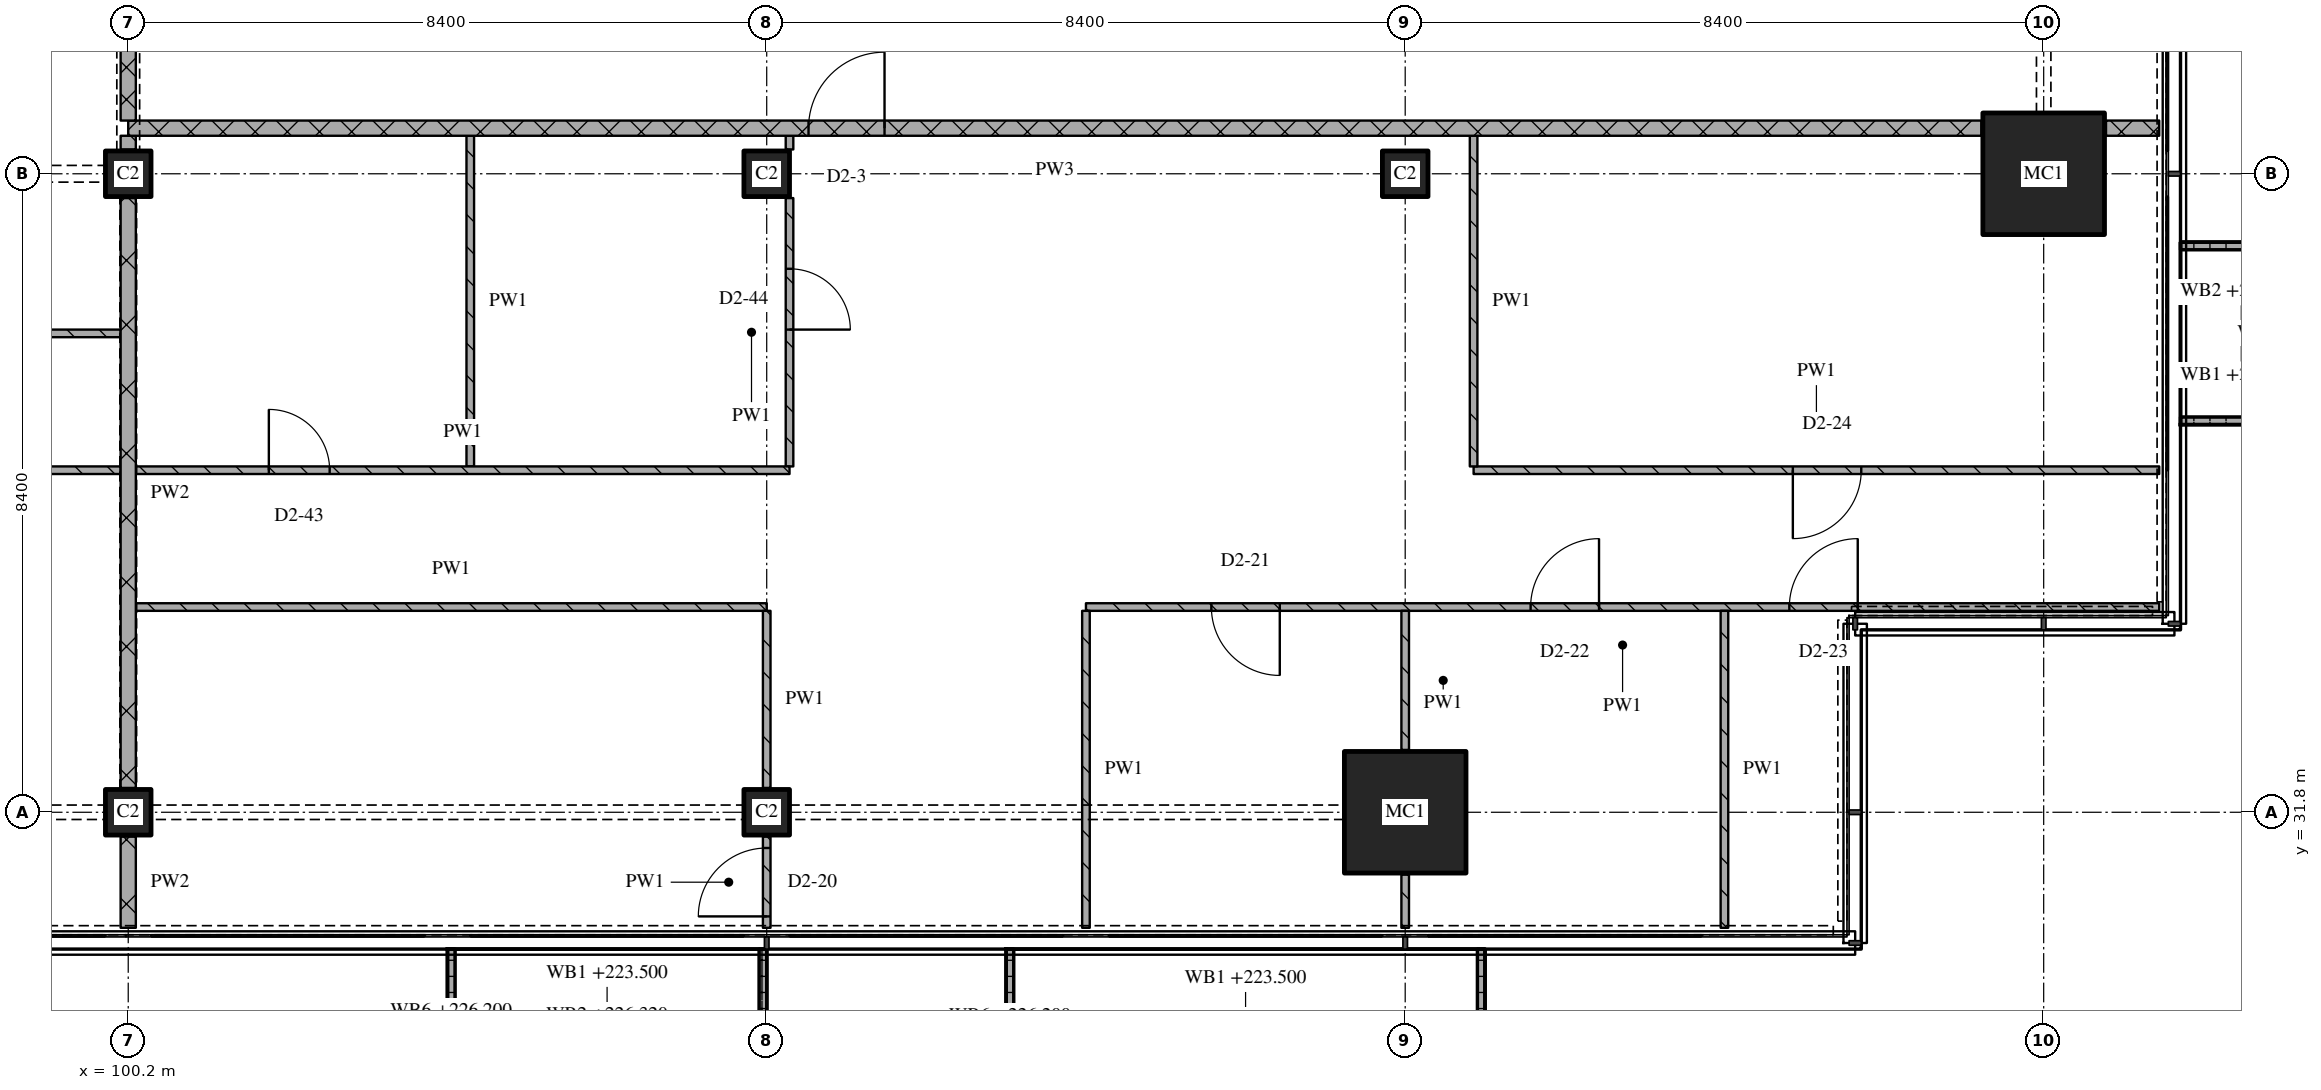
"""IFC4 building model, lengths in metres.
Left out: names, types, materials, properties, quantities, classifications, styles, units other than length and angle.
Written with IfcOpenShell. Run it as: python <this file> out.ifc"""

import sys

from ifc_helpers import new_model, si_unit, direction, frame, frame_2d, origin, origin_2d, place, context, subcontext, project, spatial, polyline, rectangle, outline, extrude, element, fill, save


model = new_model("IFC4")
c1 = context("Model", 3, precision=1e-05, world=origin(), true_north=direction((0.0, 1.0)))
c2 = subcontext(c1, "Body", "Model", "MODEL_VIEW")
j1 = project(units=[si_unit("LENGTHUNIT", "METRE"), si_unit("PLANEANGLEUNIT", "RADIAN")], contexts=[c1])
p1 = place(None, origin())
s1 = spatial("IfcSite", under=j1, at=p1, CompositionType="ELEMENT")
p2 = place(p1, origin())
s2 = spatial("IfcBuilding", under=s1, at=p2, CompositionType="ELEMENT")
p3 = place(p2, frame((0.0, 0.0, 223.5)))
s3 = spatial("IfcBuildingStorey", under=s2, at=p3, CompositionType="ELEMENT", Elevation=223.5)
for number, where, z_axis, x_axis in (
    (1, (100.2, 31.8, 0.0), (0.0, 0.0, 1.0), (1.0, 0.0, 0.0)),
    (2, (100.2, 40.2, 0.0), (0.0, 0.0, 1.0), (1.0, 0.0, 0.0)),
    (3, (108.6, 31.8, 0.0), (0.0, 0.0, 1.0), (1.0, 0.0, 0.0)),
    (4, (108.6, 40.2, 0.0), (0.0, 0.0, 1.0), (1.0, 0.0, 0.0)),
):
    element("IfcColumn", number, at=place(p3, frame(where, z_axis=z_axis, x_axis=x_axis)), inside=s3, PredefinedType="COLUMN", context=c2, shape_type="SweptSolid", body=[
        extrude(rectangle(XDim=0.6, YDim=0.6, at=origin_2d()), origin(), (0.0, 0.0, 1.0), 3.6),
    ])
p4 = place(p3, frame((117.0, 31.8, 0.0), z_axis=(0.0, 0.0, 1.0), x_axis=(1.0, 0.0, 0.0)))
e5 = element("IfcColumn", 5, at=p4, inside=s3, PredefinedType="COLUMN", context=c2, shape_type="SweptSolid", body=[
    extrude(rectangle(XDim=1.6, YDim=1.6, at=origin_2d()), origin(), (0.0, 0.0, 1.0), 3.6),
])
p5 = place(p3, frame((117.0, 40.2, 0.0), z_axis=(0.0, 0.0, 1.0), x_axis=(1.0, 0.0, 0.0)))
e6 = element("IfcColumn", 6, at=p5, inside=s3, PredefinedType="COLUMN", context=c2, shape_type="SweptSolid", body=[
    extrude(rectangle(XDim=0.6, YDim=0.6, at=origin_2d()), origin(), (0.0, 0.0, 1.0), 3.6),
])
p6 = place(p3, frame((125.4, 40.2, 0.0), z_axis=(0.0, 0.0, 1.0), x_axis=(1.0, 0.0, 0.0)))
e7 = element("IfcColumn", 7, at=p6, inside=s3, PredefinedType="COLUMN", context=c2, shape_type="SweptSolid", body=[
    extrude(rectangle(XDim=1.6, YDim=1.6, at=origin_2d()), origin(), (0.0, 0.0, 1.0), 3.6),
])
p7 = place(p3, origin())
e8 = element("IfcWall", 8, at=p7, inside=s3, PredefinedType="SOLIDWALL", context=c2, shape_type="SweptSolid", body=[
    extrude(outline(polyline([(104.4, 30.0), (104.5, 30.0), (104.5, 28.367), (108.5, 28.367), (108.5, 30.0), (108.6, 30.0), (108.6, 28.267), (104.4, 28.267), (104.4, 30.0)])), origin(), (0.0, 0.0, 1.0), 1.0),
])
p8 = place(p3, origin())
e9 = element("IfcWall", 9, at=p8, inside=s3, PredefinedType="SOLIDWALL", context=c2, shape_type="SweptSolid", body=[
    extrude(outline(polyline([(111.75, 30.0), (111.85, 30.0), (111.85, 28.233), (117.95, 28.233), (117.95, 30.0), (118.05, 30.0), (118.05, 28.133), (111.75, 28.133), (111.75, 30.0)])), origin(), (0.0, 0.0, 1.0), 1.0),
])
p9 = place(p3, origin())
e10 = element("IfcWall", 10, at=p9, inside=s3, PredefinedType="SOLIDWALL", context=c2, shape_type="SweptSolid", body=[
    extrude(outline(polyline([(127.2, 36.9), (127.2, 37.0), (128.7, 37.0), (128.7, 39.2), (127.2, 39.2), (127.2, 39.3), (128.8, 39.3), (128.8, 36.9), (127.2, 36.9)])), origin(), (0.0, 0.0, 1.0), 1.0),
])
p10 = place(p3, frame((100.3, 34.5, 0.0), z_axis=(0.0, 0.0, 1.0), x_axis=(1.0, 0.0, 0.0)))
e11 = element("IfcWall", 11, at=p10, inside=s3, PredefinedType="PARTITIONING", context=c2, shape_type="SweptSolid", body=[
    extrude(rectangle(XDim=8.3, YDim=0.1, at=frame_2d((4.15, 0.0))), origin(), (0.0, 0.0, 1.0), 3.32),
])
p11 = place(p3, frame((126.92, 34.5, 0.0), z_axis=(0.0, 0.0, 1.0), x_axis=(-1.0, 0.0, 0.0)))
e12 = element("IfcWall", 12, at=p11, inside=s3, PredefinedType="PARTITIONING", context=c2, shape_type="SweptSolid", body=[
    extrude(rectangle(XDim=14.12, YDim=0.1, at=frame_2d((7.06, 0.0))), origin(), (0.0, 0.0, 1.0), 3.32),
])
p12 = place(p11, frame((3.966, 0.0, 0.0)))
e13 = element("IfcOpeningElement", 13, at=p12, cuts=e12, PredefinedType="OPENING", context=c2, shape_type="SweptSolid", body=[
    extrude(rectangle(XDim=0.9, YDim=2.1, at=frame_2d((0.45, 1.05))), frame((0.0, 0.06, 0.0), z_axis=(0.0, -1.0, 0.0), x_axis=(1.0, 0.0, 0.0)), (0.0, 0.0, 1.0), 0.12),
])
p13 = place(p11, frame((7.37, 0.0, 0.0)))
e14 = element("IfcOpeningElement", 14, at=p13, cuts=e12, PredefinedType="OPENING", context=c2, shape_type="SweptSolid", body=[
    extrude(rectangle(XDim=0.9, YDim=2.1, at=frame_2d((0.45, 1.05))), frame((0.0, 0.06, 0.0), z_axis=(0.0, -1.0, 0.0), x_axis=(1.0, 0.0, 0.0)), (0.0, 0.0, 1.0), 0.12),
])
p14 = place(p11, frame((11.57, 0.0, 0.0)))
e15 = element("IfcOpeningElement", 15, at=p14, cuts=e12, PredefinedType="OPENING", context=c2, shape_type="SweptSolid", body=[
    extrude(rectangle(XDim=0.9, YDim=2.1, at=frame_2d((0.45, 1.05))), frame((0.0, 0.06, 0.0), z_axis=(0.0, -1.0, 0.0), x_axis=(1.0, 0.0, 0.0)), (0.0, 0.0, 1.0), 0.12),
])
p15 = place(p3, frame((117.9, 36.3, 0.0), z_axis=(0.0, 0.0, 1.0), x_axis=(1.0, 0.0, 0.0)))
e16 = element("IfcWall", 16, at=p15, inside=s3, PredefinedType="PARTITIONING", context=c2, shape_type="SweptSolid", body=[
    extrude(rectangle(XDim=9.02, YDim=0.1, at=frame_2d((4.51, 0.0))), origin(), (0.0, 0.0, 1.0), 3.32),
])
p16 = place(p15, frame((4.2, 0.0, 0.0)))
e17 = element("IfcOpeningElement", 17, at=p16, cuts=e16, PredefinedType="OPENING", context=c2, shape_type="SweptSolid", body=[
    extrude(rectangle(XDim=0.9, YDim=2.1, at=frame_2d((0.45, 1.05))), frame((0.0, 0.06, 0.0), z_axis=(0.0, -1.0, 0.0), x_axis=(1.0, 0.0, 0.0)), (0.0, 0.0, 1.0), 0.12),
])
p17 = place(p3, frame((95.4, 38.1, 0.0), z_axis=(0.0, 0.0, 1.0), x_axis=(1.0, 0.0, 0.0)))
e18 = element("IfcWall", 18, at=p17, inside=s3, PredefinedType="PARTITIONING", context=c2, shape_type="SweptSolid", body=[
    extrude(rectangle(XDim=4.7, YDim=0.1, at=frame_2d((2.35, 0.0))), origin(), (0.0, 0.0, 1.0), 3.32),
])
p18 = place(p17, frame((1.95, 0.0, 0.0)))
e19 = element("IfcOpeningElement", 19, at=p18, cuts=e18, PredefinedType="OPENING", context=c2, shape_type="SweptSolid", body=[
    extrude(rectangle(XDim=0.9, YDim=2.1, at=frame_2d((0.45, 1.05))), frame((0.0, 0.06, 0.0), z_axis=(0.0, -1.0, 0.0), x_axis=(1.0, 0.0, 0.0)), (0.0, 0.0, 1.0), 0.12),
])
p19 = place(p3, frame((124.58, 40.8, 0.0), z_axis=(0.0, 0.0, 1.0), x_axis=(-1.0, 0.0, 0.0)))
e20 = element("IfcWall", 20, at=p19, inside=s3, PredefinedType="PARTITIONING", context=c2, shape_type="SweptSolid", body=[
    extrude(rectangle(XDim=24.38, YDim=0.2, at=frame_2d((12.19, 0.0))), origin(), (0.0, 0.0, 1.0), 3.32),
])
p20 = place(p19, frame((14.43, 0.0, 0.0)))
e21 = element("IfcOpeningElement", 21, at=p20, cuts=e20, PredefinedType="OPENING", context=c2, shape_type="SweptSolid", body=[
    extrude(rectangle(XDim=1.0, YDim=2.1, at=frame_2d((0.5, 1.05))), frame((0.0, 0.11, 0.0), z_axis=(0.0, -1.0, 0.0), x_axis=(1.0, 0.0, 0.0)), (0.0, 0.0, 1.0), 0.22),
])
p21 = place(p3, frame((126.22, 40.8, 0.0), z_axis=(0.0, 0.0, 1.0), x_axis=(1.0, 0.0, 0.0)))
e22 = element("IfcWall", 22, at=p21, inside=s3, PredefinedType="PARTITIONING", context=c2, shape_type="SweptSolid", body=[
    extrude(rectangle(XDim=0.7, YDim=0.2, at=frame_2d((0.35, 0.0))), origin(), (0.0, 0.0, 1.0), 3.32),
])
p22 = place(p3, frame((100.2, 43.1, 0.0), z_axis=(0.0, 0.0, 1.0), x_axis=(0.0, -1.0, 0.0)))
e23 = element("IfcWall", 23, at=p22, inside=s3, PredefinedType="PARTITIONING", context=c2, shape_type="SweptSolid", body=[
    extrude(rectangle(XDim=2.2, YDim=0.2, at=frame_2d((1.1, 0.0))), origin(), (0.0, 0.0, 1.0), 2.53),
])
p23 = place(p3, frame((100.2, 31.48, 0.0), z_axis=(0.0, 0.0, 1.0), x_axis=(0.0, -1.0, 0.0)))
e24 = element("IfcWall", 24, at=p23, inside=s3, PredefinedType="PARTITIONING", context=c2, shape_type="SweptSolid", body=[
    extrude(rectangle(XDim=1.2, YDim=0.2, at=frame_2d((0.6, 0.0))), origin(), (0.0, 0.0, 1.0), 3.32),
])
p24 = place(p3, frame((100.2, 39.88, 0.0), z_axis=(0.0, 0.0, 1.0), x_axis=(0.0, -1.0, 0.0)))
e25 = element("IfcWall", 25, at=p24, inside=s3, PredefinedType="PARTITIONING", context=c2, shape_type="SweptSolid", body=[
    extrude(rectangle(XDim=7.76, YDim=0.2, at=frame_2d((3.88, 0.0))), origin(), (0.0, 0.0, 1.0), 2.72),
])
p25 = place(p3, frame((100.2, 40.7, 0.0), z_axis=(0.0, 0.0, 1.0), x_axis=(0.0, -1.0, 0.0)))
e26 = element("IfcWall", 26, at=p25, inside=s3, PredefinedType="PARTITIONING", context=c2, shape_type="SweptSolid", body=[
    extrude(rectangle(XDim=0.18, YDim=0.2, at=frame_2d((0.09, 0.0))), origin(), (0.0, 0.0, 1.0), 3.32),
])
p26 = place(p3, frame((104.7, 40.7, 0.0), z_axis=(0.0, 0.0, 1.0), x_axis=(0.0, -1.0, 0.0)))
e27 = element("IfcWall", 27, at=p26, inside=s3, PredefinedType="PARTITIONING", context=c2, shape_type="SweptSolid", body=[
    extrude(rectangle(XDim=4.35, YDim=0.1, at=frame_2d((2.175, 0.0))), origin(), (0.0, 0.0, 1.0), 3.32),
])
p27 = place(p3, frame((108.6, 30.28, 0.0), z_axis=(0.0, 0.0, 1.0), x_axis=(0.0, 1.0, 0.0)))
e28 = element("IfcWall", 28, at=p27, inside=s3, PredefinedType="PARTITIONING", context=c2, shape_type="SweptSolid", body=[
    extrude(rectangle(XDim=1.2, YDim=0.1, at=frame_2d((0.6, 0.0))), origin(), (0.0, 0.0, 1.0), 3.32),
])
p28 = place(p27, frame((0.15, 0.0, 0.0)))
e29 = element("IfcOpeningElement", 29, at=p28, cuts=e28, PredefinedType="OPENING", context=c2, shape_type="SweptSolid", body=[
    extrude(rectangle(XDim=0.9, YDim=2.1, at=frame_2d((0.45, 1.05))), frame((0.0, 0.06, 0.0), z_axis=(0.0, -1.0, 0.0), x_axis=(1.0, 0.0, 0.0)), (0.0, 0.0, 1.0), 0.12),
])
p29 = place(p3, frame((108.6, 34.45, 0.0), z_axis=(0.0, 0.0, 1.0), x_axis=(0.0, -1.0, 0.0)))
e30 = element("IfcWall", 30, at=p29, inside=s3, PredefinedType="PARTITIONING", context=c2, shape_type="SweptSolid", body=[
    extrude(rectangle(XDim=2.33, YDim=0.1, at=frame_2d((1.165, 0.0))), origin(), (0.0, 0.0, 1.0), 3.32),
])
p30 = place(p3, frame((108.9, 36.35, 0.0), z_axis=(0.0, 0.0, 1.0), x_axis=(0.0, 1.0, 0.0)))
e31 = element("IfcWall", 31, at=p30, inside=s3, PredefinedType="PARTITIONING", context=c2, shape_type="SweptSolid", body=[
    extrude(rectangle(XDim=3.53, YDim=0.1, at=frame_2d((1.765, 0.0))), origin(), (0.0, 0.0, 1.0), 3.32),
])
p31 = place(p30, frame((1.8, 0.0, 0.0)))
e32 = element("IfcOpeningElement", 32, at=p31, cuts=e31, PredefinedType="OPENING", context=c2, shape_type="SweptSolid", body=[
    extrude(rectangle(XDim=0.8, YDim=2.1, at=frame_2d((0.4, 1.05))), frame((0.0, 0.06, 0.0), z_axis=(0.0, -1.0, 0.0), x_axis=(1.0, 0.0, 0.0)), (0.0, 0.0, 1.0), 0.12),
])
p32 = place(p3, frame((108.9, 40.7, 0.0), z_axis=(0.0, 0.0, 1.0), x_axis=(0.0, -1.0, 0.0)))
e33 = element("IfcWall", 33, at=p32, inside=s3, PredefinedType="PARTITIONING", context=c2, shape_type="SweptSolid", body=[
    extrude(rectangle(XDim=0.18, YDim=0.1, at=frame_2d((0.09, 0.0))), origin(), (0.0, 0.0, 1.0), 3.32),
])
p33 = place(p3, frame((112.8, 34.45, 0.0), z_axis=(0.0, 0.0, 1.0), x_axis=(0.0, -1.0, 0.0)))
e34 = element("IfcWall", 34, at=p33, inside=s3, PredefinedType="PARTITIONING", context=c2, shape_type="SweptSolid", body=[
    extrude(rectangle(XDim=4.17, YDim=0.1, at=frame_2d((2.085, 0.0))), origin(), (0.0, 0.0, 1.0), 3.32),
])
p34 = place(p3, frame((117.0, 30.98, 0.0), z_axis=(0.0, 0.0, 1.0), x_axis=(0.0, -1.0, 0.0)))
e35 = element("IfcWall", 35, at=p34, inside=s3, PredefinedType="PARTITIONING", context=c2, shape_type="SweptSolid", body=[
    extrude(rectangle(XDim=0.7, YDim=0.1, at=frame_2d((0.35, 0.0))), origin(), (0.0, 0.0, 1.0), 3.32),
])
p35 = place(p3, frame((117.0, 34.45, 0.0), z_axis=(0.0, 0.0, 1.0), x_axis=(0.0, -1.0, 0.0)))
e36 = element("IfcWall", 36, at=p35, inside=s3, PredefinedType="PARTITIONING", context=c2, shape_type="SweptSolid", body=[
    extrude(rectangle(XDim=1.83, YDim=0.1, at=frame_2d((0.915, 0.0))), origin(), (0.0, 0.0, 1.0), 3.32),
])
p36 = place(p3, frame((117.9, 40.7, 0.0), z_axis=(0.0, 0.0, 1.0), x_axis=(0.0, -1.0, 0.0)))
e37 = element("IfcWall", 37, at=p36, inside=s3, PredefinedType="PARTITIONING", context=c2, shape_type="SweptSolid", body=[
    extrude(rectangle(XDim=4.35, YDim=0.1, at=frame_2d((2.175, 0.0))), origin(), (0.0, 0.0, 1.0), 3.32),
])
p37 = place(p3, frame((121.2, 34.45, 0.0), z_axis=(0.0, 0.0, 1.0), x_axis=(0.0, -1.0, 0.0)))
e38 = element("IfcWall", 38, at=p37, inside=s3, PredefinedType="PARTITIONING", context=c2, shape_type="SweptSolid", body=[
    extrude(rectangle(XDim=4.17, YDim=0.1, at=frame_2d((2.085, 0.0))), origin(), (0.0, 0.0, 1.0), 3.32),
])
p38 = place(p3, frame((100.1, 36.3, 0.0), z_axis=(0.0, 0.0, 1.0), x_axis=(-1.0, 0.0, 0.0)))
e39 = element("IfcWall", 39, at=p38, inside=s3, PredefinedType="PARTITIONING", context=c2, shape_type="SweptSolid", body=[
    extrude(rectangle(XDim=20.9, YDim=0.1, at=frame_2d((10.45, 0.0))), origin(), (0.0, 0.0, 1.0), 3.32),
])
p39 = place(p38, frame((1.55, 0.0, 0.0)))
e40 = element("IfcOpeningElement", 40, at=p39, cuts=e39, PredefinedType="OPENING", context=c2, shape_type="SweptSolid", body=[
    extrude(rectangle(XDim=0.9, YDim=2.1, at=frame_2d((0.45, 1.05))), frame((0.0, 0.06, 0.0), z_axis=(0.0, -1.0, 0.0), x_axis=(1.0, 0.0, 0.0)), (0.0, 0.0, 1.0), 0.12),
])
p40 = place(p38, frame((7.85, 0.0, 0.0)))
e41 = element("IfcOpeningElement", 41, at=p40, cuts=e39, PredefinedType="OPENING", context=c2, shape_type="SweptSolid", body=[
    extrude(rectangle(XDim=0.9, YDim=2.1, at=frame_2d((0.45, 1.05))), frame((0.0, 0.06, 0.0), z_axis=(0.0, -1.0, 0.0), x_axis=(1.0, 0.0, 0.0)), (0.0, 0.0, 1.0), 0.12),
])
p41 = place(p38, frame((16.25, 0.0, 0.0)))
e42 = element("IfcOpeningElement", 42, at=p41, cuts=e39, PredefinedType="OPENING", context=c2, shape_type="SweptSolid", body=[
    extrude(rectangle(XDim=0.9, YDim=2.1, at=frame_2d((0.45, 1.05))), frame((0.0, 0.06, 0.0), z_axis=(0.0, -1.0, 0.0), x_axis=(1.0, 0.0, 0.0)), (0.0, 0.0, 1.0), 0.12),
])
p42 = place(p3, frame((100.3, 36.3, 0.0), z_axis=(0.0, 0.0, 1.0), x_axis=(1.0, 0.0, 0.0)))
e43 = element("IfcWall", 43, at=p42, inside=s3, PredefinedType="PARTITIONING", context=c2, shape_type="SweptSolid", body=[
    extrude(rectangle(XDim=8.6, YDim=0.1, at=frame_2d((4.3, 0.0))), origin(), (0.0, 0.0, 1.0), 3.32),
])
p43 = place(p42, frame((1.75, 0.0, 0.0)))
e44 = element("IfcOpeningElement", 44, at=p43, cuts=e43, PredefinedType="OPENING", context=c2, shape_type="SweptSolid", body=[
    extrude(rectangle(XDim=0.8, YDim=2.1, at=frame_2d((0.4, 1.05))), frame((0.0, 0.06, 0.0), z_axis=(0.0, -1.0, 0.0), x_axis=(1.0, 0.0, 0.0)), (0.0, 0.0, 1.0), 0.12),
])
p44 = place(p12, origin())
e45 = element("IfcDoor", 45, at=p44, inside=s3, OperationType="SINGLE_SWING_RIGHT", PredefinedType="DOOR", context=c2, shape_type="SweptSolid", body=[
    extrude(rectangle(XDim=0.9, YDim=2.1, at=frame_2d((0.45, 1.05))), frame((0.0, 0.025, 0.0), z_axis=(0.0, -1.0, 0.0), x_axis=(1.0, 0.0, 0.0)), (0.0, 0.0, 1.0), 0.05),
])
fill(e13, e45)
p45 = place(p13, origin())
e46 = element("IfcDoor", 46, at=p45, inside=s3, OperationType="SINGLE_SWING_RIGHT", PredefinedType="DOOR", context=c2, shape_type="SweptSolid", body=[
    extrude(rectangle(XDim=0.9, YDim=2.1, at=frame_2d((0.45, 1.05))), frame((0.0, 0.025, 0.0), z_axis=(0.0, -1.0, 0.0), x_axis=(1.0, 0.0, 0.0)), (0.0, 0.0, 1.0), 0.05),
])
fill(e14, e46)
p46 = place(p14, origin())
e47 = element("IfcDoor", 47, at=p46, inside=s3, OperationType="SINGLE_SWING_LEFT", PredefinedType="DOOR", context=c2, shape_type="SweptSolid", body=[
    extrude(rectangle(XDim=0.9, YDim=2.1, at=frame_2d((0.45, 1.05))), frame((0.0, 0.025, 0.0), z_axis=(0.0, -1.0, 0.0), x_axis=(1.0, 0.0, 0.0)), (0.0, 0.0, 1.0), 0.05),
])
fill(e15, e47)
p47 = place(p16, origin())
e48 = element("IfcDoor", 48, at=p47, inside=s3, OperationType="SINGLE_SWING_RIGHT", PredefinedType="DOOR", context=c2, shape_type="SweptSolid", body=[
    extrude(rectangle(XDim=0.9, YDim=2.1, at=frame_2d((0.45, 1.05))), frame((0.0, 0.025, 0.0), z_axis=(0.0, -1.0, 0.0), x_axis=(1.0, 0.0, 0.0)), (0.0, 0.0, 1.0), 0.05),
])
fill(e17, e48)
p48 = place(p20, origin())
e49 = element("IfcDoor", 49, at=p48, inside=s3, OperationType="SINGLE_SWING_RIGHT", PredefinedType="DOOR", context=c2, shape_type="SweptSolid", body=[
    extrude(rectangle(XDim=1.0, YDim=2.1, at=frame_2d((0.5, 1.05))), frame((0.0, 0.025, 0.0), z_axis=(0.0, -1.0, 0.0), x_axis=(1.0, 0.0, 0.0)), (0.0, 0.0, 1.0), 0.05),
])
fill(e21, e49)
p49 = place(p28, origin())
e50 = element("IfcDoor", 50, at=p49, inside=s3, OperationType="SINGLE_SWING_LEFT", PredefinedType="DOOR", context=c2, shape_type="SweptSolid", body=[
    extrude(rectangle(XDim=0.9, YDim=2.1, at=frame_2d((0.45, 1.05))), frame((0.0, 0.025, 0.0), z_axis=(0.0, -1.0, 0.0), x_axis=(1.0, 0.0, 0.0)), (0.0, 0.0, 1.0), 0.05),
])
fill(e29, e50)
p50 = place(p31, origin())
e51 = element("IfcDoor", 51, at=p50, inside=s3, OperationType="SINGLE_SWING_RIGHT", PredefinedType="DOOR", context=c2, shape_type="SweptSolid", body=[
    extrude(rectangle(XDim=0.8, YDim=2.1, at=frame_2d((0.4, 1.05))), frame((0.0, 0.025, 0.0), z_axis=(0.0, -1.0, 0.0), x_axis=(1.0, 0.0, 0.0)), (0.0, 0.0, 1.0), 0.05),
])
fill(e32, e51)
p51 = place(p43, origin())
e52 = element("IfcDoor", 52, at=p51, inside=s3, OperationType="SINGLE_SWING_LEFT", PredefinedType="DOOR", context=c2, shape_type="SweptSolid", body=[
    extrude(rectangle(XDim=0.8, YDim=2.1, at=frame_2d((0.4, 1.05))), frame((0.0, 0.025, 0.0), z_axis=(0.0, -1.0, 0.0), x_axis=(1.0, 0.0, 0.0)), (0.0, 0.0, 1.0), 0.05),
])
fill(e44, e52)
save(model, sys.argv[1])
